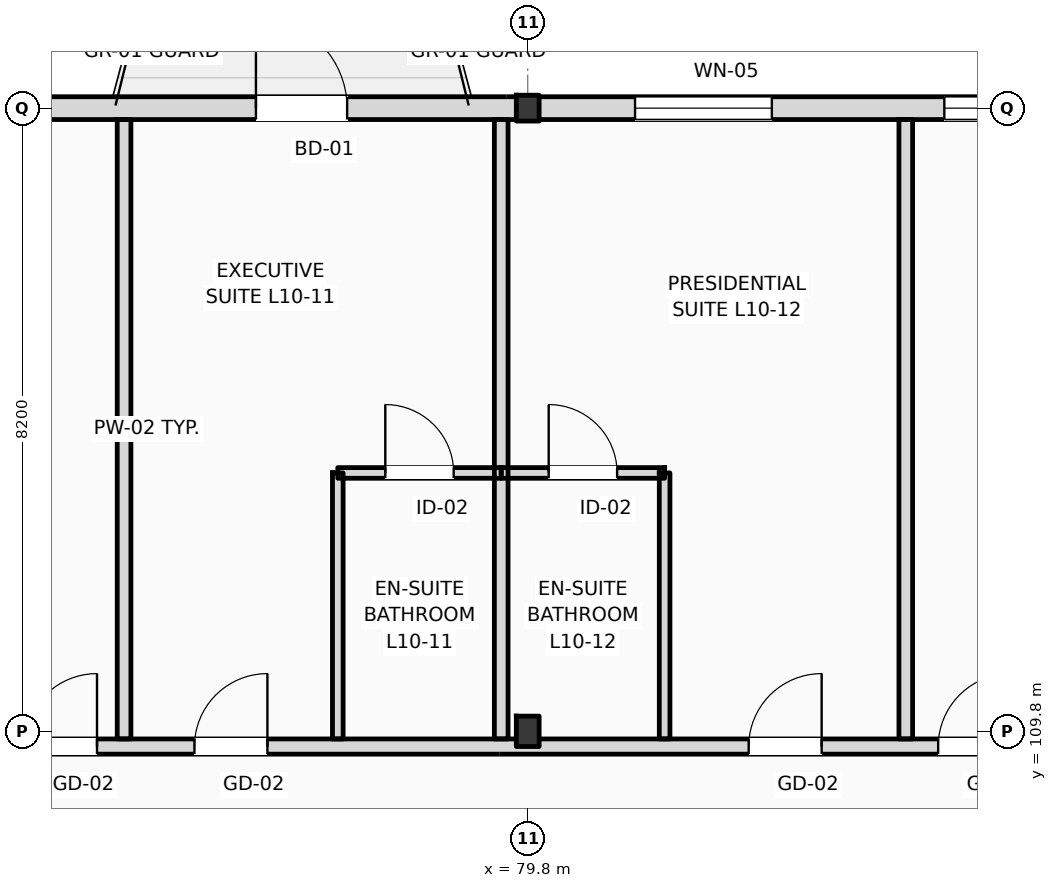
"""IFC4 building model, lengths in metres.
Left out: names, types, materials, properties, quantities, classifications, styles, units other than length and angle.
Written with IfcOpenShell. Run it as: python <this file> out.ifc"""

import sys

from ifc_helpers import new_model, si_unit, direction, frame, frame_2d, origin, origin_2d, place, context, subcontext, project, spatial, rectangle, i_section, extrude, element, fill, save


model = new_model("IFC4")
c1 = context("Model", 3, precision=1e-05, world=origin(), true_north=direction((0.0, 1.0)))
c2 = subcontext(c1, "Body", "Model", "MODEL_VIEW")
j1 = project(units=[si_unit("LENGTHUNIT", "METRE"), si_unit("PLANEANGLEUNIT", "RADIAN")], contexts=[c1])
p1 = place(None, origin())
s1 = spatial("IfcSite", under=j1, at=p1, CompositionType="ELEMENT")
p2 = place(p1, origin())
s2 = spatial("IfcBuilding", under=s1, at=p2, CompositionType="ELEMENT")
p3 = place(p2, frame((0.0, 0.0, 42.6)))
s3 = spatial("IfcBuildingStorey", under=s2, at=p3, CompositionType="ELEMENT", Elevation=42.6)
p4 = place(p3, frame((79.8, 109.8, 0.0), z_axis=(0.0, 0.0, 1.0), x_axis=(1.0, 0.0, 0.0)))
e1 = element("IfcColumn", 1, at=p4, inside=s3, PredefinedType="COLUMN", context=c2, shape_type="SweptSolid", body=[
    extrude(i_section(OverallWidth=0.3, OverallDepth=0.4, WebThickness=0.013, FlangeThickness=0.024, FilletRadius=0.027, at=origin_2d()), origin(), (0.0, 0.0, 1.0), 4.2),
])
p5 = place(p3, frame((79.8, 118.0, 0.0), z_axis=(0.0, 0.0, 1.0), x_axis=(1.0, 0.0, 0.0)))
e2 = element("IfcColumn", 2, at=p5, inside=s3, PredefinedType="COLUMN", context=c2, shape_type="SweptSolid", body=[
    extrude(i_section(OverallWidth=0.3, OverallDepth=0.34, WebThickness=0.012, FlangeThickness=0.021, FilletRadius=0.027, at=origin_2d()), origin(), (0.0, 0.0, 1.0), 4.2),
])
p6 = place(p3, frame((22.5, 118.0, 0.0), z_axis=(0.0, 0.0, 1.0), x_axis=(1.0, 0.0, 0.0)))
e3 = element("IfcWall", 3, at=p6, inside=s3, PredefinedType="STANDARD", context=c2, shape_type="SweptSolid", body=[
    extrude(rectangle(XDim=72.9, YDim=0.3, at=frame_2d((36.45, 0.0))), origin(), (0.0, 0.0, 1.0), 3.42),
])
p7 = place(p6, frame((3.611, 0.0, 0.9)))
e4 = element("IfcOpeningElement", 4, at=p7, cuts=e3, PredefinedType="OPENING", context=c2, shape_type="SweptSolid", body=[
    extrude(rectangle(XDim=1.35, YDim=1.75, at=frame_2d((0.675, 0.875))), frame((0.0, 0.16, 0.0), z_axis=(0.0, -1.0, 0.0), x_axis=(1.0, 0.0, 0.0)), (0.0, 0.0, 1.0), 0.32),
])
p8 = place(p6, frame((7.091, 0.0, 0.0)))
e5 = element("IfcOpeningElement", 5, at=p8, cuts=e3, PredefinedType="OPENING", context=c2, shape_type="SweptSolid", body=[
    extrude(rectangle(XDim=1.2, YDim=2.25, at=frame_2d((0.6, 1.125))), frame((0.0, 0.16, 0.0), z_axis=(0.0, -1.0, 0.0), x_axis=(1.0, 0.0, 0.0)), (0.0, 0.0, 1.0), 0.32),
])
p9 = place(p6, frame((12.328, 0.0, 0.9)))
e6 = element("IfcOpeningElement", 6, at=p9, cuts=e3, PredefinedType="OPENING", context=c2, shape_type="SweptSolid", body=[
    extrude(rectangle(XDim=2.0, YDim=2.34, at=frame_2d((1.0, 1.17))), frame((0.0, 0.16, 0.0), z_axis=(0.0, -1.0, 0.0), x_axis=(1.0, 0.0, 0.0)), (0.0, 0.0, 1.0), 0.32),
])
p10 = place(p6, frame((19.12, 0.0, 0.9)))
e7 = element("IfcOpeningElement", 7, at=p10, cuts=e3, PredefinedType="OPENING", context=c2, shape_type="SweptSolid", body=[
    extrude(rectangle(XDim=1.35, YDim=2.34, at=frame_2d((0.675, 1.17))), frame((0.0, 0.16, 0.0), z_axis=(0.0, -1.0, 0.0), x_axis=(1.0, 0.0, 0.0)), (0.0, 0.0, 1.0), 0.32),
])
p11 = place(p6, frame((22.696, 0.0, 0.0)))
e8 = element("IfcOpeningElement", 8, at=p11, cuts=e3, PredefinedType="OPENING", context=c2, shape_type="SweptSolid", body=[
    extrude(rectangle(XDim=1.2, YDim=2.25, at=frame_2d((0.6, 1.125))), frame((0.0, 0.16, 0.0), z_axis=(0.0, -1.0, 0.0), x_axis=(1.0, 0.0, 0.0)), (0.0, 0.0, 1.0), 0.32),
])
p12 = place(p6, frame((27.205, 0.0, 0.9)))
e9 = element("IfcOpeningElement", 9, at=p12, cuts=e3, PredefinedType="OPENING", context=c2, shape_type="SweptSolid", body=[
    extrude(rectangle(XDim=3.1, YDim=2.34, at=frame_2d((1.55, 1.17))), frame((0.0, 0.16, 0.0), z_axis=(0.0, -1.0, 0.0), x_axis=(1.0, 0.0, 0.0)), (0.0, 0.0, 1.0), 0.32),
])
p13 = place(p6, frame((31.948, 0.0, 0.9)))
e10 = element("IfcOpeningElement", 10, at=p13, cuts=e3, PredefinedType="OPENING", context=c2, shape_type="SweptSolid", body=[
    extrude(rectangle(XDim=1.1, YDim=2.34, at=frame_2d((0.55, 1.17))), frame((0.0, 0.16, 0.0), z_axis=(0.0, -1.0, 0.0), x_axis=(1.0, 0.0, 0.0)), (0.0, 0.0, 1.0), 0.32),
])
p14 = place(p6, frame((38.12, 0.0, 0.0)))
e11 = element("IfcOpeningElement", 11, at=p14, cuts=e3, PredefinedType="OPENING", context=c2, shape_type="SweptSolid", body=[
    extrude(rectangle(XDim=1.2, YDim=2.25, at=frame_2d((0.6, 1.125))), frame((0.0, 0.16, 0.0), z_axis=(0.0, -1.0, 0.0), x_axis=(1.0, 0.0, 0.0)), (0.0, 0.0, 1.0), 0.32),
])
p15 = place(p6, frame((43.51, 0.0, 0.9)))
e12 = element("IfcOpeningElement", 12, at=p15, cuts=e3, PredefinedType="OPENING", context=c2, shape_type="SweptSolid", body=[
    extrude(rectangle(XDim=1.35, YDim=1.85, at=frame_2d((0.675, 0.925))), frame((0.0, 0.16, 0.0), z_axis=(0.0, -1.0, 0.0), x_axis=(1.0, 0.0, 0.0)), (0.0, 0.0, 1.0), 0.32),
])
p16 = place(p6, frame((47.178, 0.0, 0.9)))
e13 = element("IfcOpeningElement", 13, at=p16, cuts=e3, PredefinedType="OPENING", context=c2, shape_type="SweptSolid", body=[
    extrude(rectangle(XDim=1.5, YDim=1.9, at=frame_2d((0.75, 0.95))), frame((0.0, 0.16, 0.0), z_axis=(0.0, -1.0, 0.0), x_axis=(1.0, 0.0, 0.0)), (0.0, 0.0, 1.0), 0.32),
])
p17 = place(p6, frame((53.724, 0.0, 0.0)))
e14 = element("IfcOpeningElement", 14, at=p17, cuts=e3, PredefinedType="OPENING", context=c2, shape_type="SweptSolid", body=[
    extrude(rectangle(XDim=1.2, YDim=2.25, at=frame_2d((0.6, 1.125))), frame((0.0, 0.16, 0.0), z_axis=(0.0, -1.0, 0.0), x_axis=(1.0, 0.0, 0.0)), (0.0, 0.0, 1.0), 0.32),
])
p18 = place(p6, frame((58.712, 0.0, 0.9)))
e15 = element("IfcOpeningElement", 15, at=p18, cuts=e3, PredefinedType="OPENING", context=c2, shape_type="SweptSolid", body=[
    extrude(rectangle(XDim=1.8, YDim=2.0, at=frame_2d((0.9, 1.0))), frame((0.0, 0.16, 0.0), z_axis=(0.0, -1.0, 0.0), x_axis=(1.0, 0.0, 0.0)), (0.0, 0.0, 1.0), 0.32),
])
p19 = place(p6, frame((62.781, 0.0, 0.9)))
e16 = element("IfcOpeningElement", 16, at=p19, cuts=e3, PredefinedType="OPENING", context=c2, shape_type="SweptSolid", body=[
    extrude(rectangle(XDim=1.35, YDim=2.05, at=frame_2d((0.675, 1.025))), frame((0.0, 0.16, 0.0), z_axis=(0.0, -1.0, 0.0), x_axis=(1.0, 0.0, 0.0)), (0.0, 0.0, 1.0), 0.32),
])
p20 = place(p6, frame((68.819, 0.0, 0.9)))
e17 = element("IfcOpeningElement", 17, at=p20, cuts=e3, PredefinedType="OPENING", context=c2, shape_type="SweptSolid", body=[
    extrude(rectangle(XDim=2.1, YDim=2.1, at=frame_2d((1.05, 1.05))), frame((0.0, 0.16, 0.0), z_axis=(0.0, -1.0, 0.0), x_axis=(1.0, 0.0, 0.0)), (0.0, 0.0, 1.0), 0.32),
])
p21 = place(p3, frame((10.65, 109.6, 0.0), z_axis=(0.0, 0.0, 1.0), x_axis=(1.0, 0.0, 0.0)))
e18 = element("IfcWall", 18, at=p21, inside=s3, PredefinedType="PARTITIONING", context=c2, shape_type="SweptSolid", body=[
    extrude(rectangle(XDim=84.61, YDim=0.2, at=frame_2d((42.305, 0.0))), origin(), (0.0, 0.0, 1.0), 3.38),
])
p22 = place(p21, frame((15.926, 0.0, 0.0)))
e19 = element("IfcOpeningElement", 19, at=p22, cuts=e18, PredefinedType="OPENING", context=c2, shape_type="SweptSolid", body=[
    extrude(rectangle(XDim=1.02, YDim=2.2, at=frame_2d((0.51, 1.1))), frame((0.0, 0.11, 0.0), z_axis=(0.0, -1.0, 0.0), x_axis=(1.0, 0.0, 0.0)), (0.0, 0.0, 1.0), 0.22),
])
p23 = place(p21, frame((18.45, 0.0, 0.0)))
e20 = element("IfcOpeningElement", 20, at=p23, cuts=e18, PredefinedType="OPENING", context=c2, shape_type="SweptSolid", body=[
    extrude(rectangle(XDim=1.02, YDim=2.2, at=frame_2d((0.51, 1.1))), frame((0.0, 0.11, 0.0), z_axis=(0.0, -1.0, 0.0), x_axis=(1.0, 0.0, 0.0)), (0.0, 0.0, 1.0), 0.22),
])
p24 = place(p21, frame((25.742, 0.0, 0.0)))
e21 = element("IfcOpeningElement", 21, at=p24, cuts=e18, PredefinedType="OPENING", context=c2, shape_type="SweptSolid", body=[
    extrude(rectangle(XDim=1.02, YDim=2.2, at=frame_2d((0.51, 1.1))), frame((0.0, 0.11, 0.0), z_axis=(0.0, -1.0, 0.0), x_axis=(1.0, 0.0, 0.0)), (0.0, 0.0, 1.0), 0.22),
])
p25 = place(p21, frame((31.385, 0.0, 0.0)))
e22 = element("IfcOpeningElement", 22, at=p25, cuts=e18, PredefinedType="OPENING", context=c2, shape_type="SweptSolid", body=[
    extrude(rectangle(XDim=1.02, YDim=2.2, at=frame_2d((0.51, 1.1))), frame((0.0, 0.11, 0.0), z_axis=(0.0, -1.0, 0.0), x_axis=(1.0, 0.0, 0.0)), (0.0, 0.0, 1.0), 0.22),
])
p26 = place(p21, frame((33.908, 0.0, 0.0)))
e23 = element("IfcOpeningElement", 23, at=p26, cuts=e18, PredefinedType="OPENING", context=c2, shape_type="SweptSolid", body=[
    extrude(rectangle(XDim=0.96, YDim=2.2, at=frame_2d((0.48, 1.1))), frame((0.0, 0.11, 0.0), z_axis=(0.0, -1.0, 0.0), x_axis=(1.0, 0.0, 0.0)), (0.0, 0.0, 1.0), 0.22),
])
p27 = place(p21, frame((41.201, 0.0, 0.0)))
e24 = element("IfcOpeningElement", 24, at=p27, cuts=e18, PredefinedType="OPENING", context=c2, shape_type="SweptSolid", body=[
    extrude(rectangle(XDim=0.96, YDim=2.2, at=frame_2d((0.48, 1.1))), frame((0.0, 0.11, 0.0), z_axis=(0.0, -1.0, 0.0), x_axis=(1.0, 0.0, 0.0)), (0.0, 0.0, 1.0), 0.22),
])
p28 = place(p21, frame((46.844, 0.0, 0.0)))
e25 = element("IfcOpeningElement", 25, at=p28, cuts=e18, PredefinedType="OPENING", context=c2, shape_type="SweptSolid", body=[
    extrude(rectangle(XDim=0.96, YDim=2.2, at=frame_2d((0.48, 1.1))), frame((0.0, 0.11, 0.0), z_axis=(0.0, -1.0, 0.0), x_axis=(1.0, 0.0, 0.0)), (0.0, 0.0, 1.0), 0.22),
])
p29 = place(p21, frame((49.337, 0.0, 0.0)))
e26 = element("IfcOpeningElement", 26, at=p29, cuts=e18, PredefinedType="OPENING", context=c2, shape_type="SweptSolid", body=[
    extrude(rectangle(XDim=0.96, YDim=2.2, at=frame_2d((0.48, 1.1))), frame((0.0, 0.11, 0.0), z_axis=(0.0, -1.0, 0.0), x_axis=(1.0, 0.0, 0.0)), (0.0, 0.0, 1.0), 0.22),
])
p30 = place(p21, frame((56.63, 0.0, 0.0)))
e27 = element("IfcOpeningElement", 27, at=p30, cuts=e18, PredefinedType="OPENING", context=c2, shape_type="SweptSolid", body=[
    extrude(rectangle(XDim=0.96, YDim=2.2, at=frame_2d((0.48, 1.1))), frame((0.0, 0.11, 0.0), z_axis=(0.0, -1.0, 0.0), x_axis=(1.0, 0.0, 0.0)), (0.0, 0.0, 1.0), 0.22),
])
p31 = place(p21, frame((62.523, 0.0, 0.0)))
e28 = element("IfcOpeningElement", 28, at=p31, cuts=e18, PredefinedType="OPENING", context=c2, shape_type="SweptSolid", body=[
    extrude(rectangle(XDim=0.96, YDim=2.2, at=frame_2d((0.48, 1.1))), frame((0.0, 0.11, 0.0), z_axis=(0.0, -1.0, 0.0), x_axis=(1.0, 0.0, 0.0)), (0.0, 0.0, 1.0), 0.22),
])
p32 = place(p21, frame((64.765, 0.0, 0.0)))
e29 = element("IfcOpeningElement", 29, at=p32, cuts=e18, PredefinedType="OPENING", context=c2, shape_type="SweptSolid", body=[
    extrude(rectangle(XDim=0.96, YDim=2.2, at=frame_2d((0.48, 1.1))), frame((0.0, 0.11, 0.0), z_axis=(0.0, -1.0, 0.0), x_axis=(1.0, 0.0, 0.0)), (0.0, 0.0, 1.0), 0.22),
])
p33 = place(p21, frame((72.057, 0.0, 0.0)))
e30 = element("IfcOpeningElement", 30, at=p33, cuts=e18, PredefinedType="OPENING", context=c2, shape_type="SweptSolid", body=[
    extrude(rectangle(XDim=0.96, YDim=2.2, at=frame_2d((0.48, 1.1))), frame((0.0, 0.11, 0.0), z_axis=(0.0, -1.0, 0.0), x_axis=(1.0, 0.0, 0.0)), (0.0, 0.0, 1.0), 0.22),
])
p34 = place(p21, frame((74.55, 0.0, 0.0)))
e31 = element("IfcOpeningElement", 31, at=p34, cuts=e18, PredefinedType="OPENING", context=c2, shape_type="SweptSolid", body=[
    extrude(rectangle(XDim=0.96, YDim=2.2, at=frame_2d((0.48, 1.1))), frame((0.0, 0.11, 0.0), z_axis=(0.0, -1.0, 0.0), x_axis=(1.0, 0.0, 0.0)), (0.0, 0.0, 1.0), 0.22),
])
p35 = place(p21, frame((80.163, 0.0, 0.0)))
e32 = element("IfcOpeningElement", 32, at=p35, cuts=e18, PredefinedType="OPENING", context=c2, shape_type="SweptSolid", body=[
    extrude(rectangle(XDim=0.96, YDim=2.2, at=frame_2d((0.48, 1.1))), frame((0.0, 0.11, 0.0), z_axis=(0.0, -1.0, 0.0), x_axis=(1.0, 0.0, 0.0)), (0.0, 0.0, 1.0), 0.22),
])
p36 = place(p21, frame((2.716, 0.0, 0.0)))
e33 = element("IfcOpeningElement", 33, at=p36, cuts=e18, PredefinedType="OPENING", context=c2, shape_type="SweptSolid", body=[
    extrude(rectangle(XDim=1.35, YDim=2.25, at=frame_2d((0.675, 1.125))), frame((0.0, 0.11, 0.0), z_axis=(0.0, -1.0, 0.0), x_axis=(1.0, 0.0, 0.0)), (0.0, 0.0, 1.0), 0.22),
])
p37 = place(p21, frame((6.65, 0.0, 0.0)))
e34 = element("IfcOpeningElement", 34, at=p37, cuts=e18, PredefinedType="OPENING", context=c2, shape_type="SweptSolid", body=[
    extrude(rectangle(XDim=1.35, YDim=2.25, at=frame_2d((0.675, 1.125))), frame((0.0, 0.11, 0.0), z_axis=(0.0, -1.0, 0.0), x_axis=(1.0, 0.0, 0.0)), (0.0, 0.0, 1.0), 0.22),
])
p38 = place(p21, frame((10.583, 0.0, 0.0)))
e35 = element("IfcOpeningElement", 35, at=p38, cuts=e18, PredefinedType="OPENING", context=c2, shape_type="SweptSolid", body=[
    extrude(rectangle(XDim=1.35, YDim=2.25, at=frame_2d((0.675, 1.125))), frame((0.0, 0.11, 0.0), z_axis=(0.0, -1.0, 0.0), x_axis=(1.0, 0.0, 0.0)), (0.0, 0.0, 1.0), 0.22),
])
p39 = place(p3, frame((74.489, 109.7, 0.0), z_axis=(0.0, 0.0, 1.0), x_axis=(0.0, 1.0, 0.0)))
e36 = element("IfcWall", 36, at=p39, inside=s3, PredefinedType="PARTITIONING", context=c2, shape_type="SweptSolid", body=[
    extrude(rectangle(XDim=8.15, YDim=0.18, at=frame_2d((4.075, 0.0))), origin(), (0.0, 0.0, 1.0), 3.63),
])
p40 = place(p3, frame((79.451, 109.7, 0.0), z_axis=(0.0, 0.0, 1.0), x_axis=(0.0, 1.0, 0.0)))
e37 = element("IfcWall", 37, at=p40, inside=s3, PredefinedType="PARTITIONING", context=c2, shape_type="SweptSolid", body=[
    extrude(rectangle(XDim=8.15, YDim=0.18, at=frame_2d((4.075, 0.0))), origin(), (0.0, 0.0, 1.0), 3.94),
])
p41 = place(p3, frame((77.301, 109.7, 0.0), z_axis=(0.0, 0.0, 1.0), x_axis=(0.0, 1.0, 0.0)))
e38 = element("IfcWall", 38, at=p41, inside=s3, PredefinedType="PARTITIONING", context=c2, shape_type="SweptSolid", body=[
    extrude(rectangle(XDim=3.5, YDim=0.14, at=frame_2d((1.75, 0.0))), origin(), (0.0, 0.0, 1.0), 3.63),
])
p42 = place(p3, frame((77.301, 113.2, 0.0), z_axis=(0.0, 0.0, 1.0), x_axis=(1.0, 0.0, 0.0)))
e39 = element("IfcWall", 39, at=p42, inside=s3, PredefinedType="PARTITIONING", context=c2, shape_type="SweptSolid", body=[
    extrude(rectangle(XDim=2.15, YDim=0.14, at=frame_2d((1.075, 0.0))), origin(), (0.0, 0.0, 1.0), 3.94),
])
p43 = place(p42, frame((0.625, 0.0, 0.0)))
e40 = element("IfcOpeningElement", 40, at=p43, cuts=e39, PredefinedType="OPENING", context=c2, shape_type="SweptSolid", body=[
    extrude(rectangle(XDim=0.9, YDim=2.1, at=frame_2d((0.45, 1.05))), frame((0.0, 0.08, 0.0), z_axis=(0.0, -1.0, 0.0), x_axis=(1.0, 0.0, 0.0)), (0.0, 0.0, 1.0), 0.16),
])
p44 = place(p3, frame((84.774, 109.7, 0.0), z_axis=(0.0, 0.0, 1.0), x_axis=(0.0, 1.0, 0.0)))
e41 = element("IfcWall", 41, at=p44, inside=s3, PredefinedType="PARTITIONING", context=c2, shape_type="SweptSolid", body=[
    extrude(rectangle(XDim=8.15, YDim=0.18, at=frame_2d((4.075, 0.0))), origin(), (0.0, 0.0, 1.0), 3.57),
])
p45 = place(p3, frame((81.601, 109.7, 0.0), z_axis=(0.0, 0.0, 1.0), x_axis=(0.0, 1.0, 0.0)))
e42 = element("IfcWall", 42, at=p45, inside=s3, PredefinedType="PARTITIONING", context=c2, shape_type="SweptSolid", body=[
    extrude(rectangle(XDim=3.5, YDim=0.14, at=frame_2d((1.75, 0.0))), origin(), (0.0, 0.0, 1.0), 3.94),
])
p46 = place(p3, frame((79.451, 113.2, 0.0), z_axis=(0.0, 0.0, 1.0), x_axis=(1.0, 0.0, 0.0)))
e43 = element("IfcWall", 43, at=p46, inside=s3, PredefinedType="PARTITIONING", context=c2, shape_type="SweptSolid", body=[
    extrude(rectangle(XDim=2.15, YDim=0.14, at=frame_2d((1.075, 0.0))), origin(), (0.0, 0.0, 1.0), 3.94),
])
p47 = place(p46, frame((0.625, 0.0, 0.0)))
e44 = element("IfcOpeningElement", 44, at=p47, cuts=e43, PredefinedType="OPENING", context=c2, shape_type="SweptSolid", body=[
    extrude(rectangle(XDim=0.9, YDim=2.1, at=frame_2d((0.45, 1.05))), frame((0.0, 0.08, 0.0), z_axis=(0.0, -1.0, 0.0), x_axis=(1.0, 0.0, 0.0)), (0.0, 0.0, 1.0), 0.16),
])
p48 = place(p17, origin())
e45 = element("IfcDoor", 45, at=p48, inside=s3, OperationType="SINGLE_SWING_LEFT", PredefinedType="DOOR", context=c2, shape_type="SweptSolid", body=[
    extrude(rectangle(XDim=1.2, YDim=2.25, at=frame_2d((0.6, 1.125))), frame((0.0, 0.025, 0.0), z_axis=(0.0, -1.0, 0.0), x_axis=(1.0, 0.0, 0.0)), (0.0, 0.0, 1.0), 0.05),
])
fill(e14, e45)
p49 = place(p18, origin())
e46 = element("IfcWindow", 46, at=p49, inside=s3, PartitioningType="DOUBLE_PANEL_VERTICAL", PredefinedType="WINDOW", context=c2, shape_type="SweptSolid", body=[
    extrude(rectangle(XDim=1.8, YDim=2.0, at=frame_2d((0.9, 1.0))), frame((0.0, 0.03, 0.0), z_axis=(0.0, -1.0, 0.0), x_axis=(1.0, 0.0, 0.0)), (0.0, 0.0, 1.0), 0.06),
])
fill(e15, e46)
p50 = place(p19, origin())
e47 = element("IfcWindow", 47, at=p50, inside=s3, PartitioningType="DOUBLE_PANEL_VERTICAL", PredefinedType="WINDOW", context=c2, shape_type="SweptSolid", body=[
    extrude(rectangle(XDim=1.35, YDim=2.05, at=frame_2d((0.675, 1.025))), frame((0.0, 0.03, 0.0), z_axis=(0.0, -1.0, 0.0), x_axis=(1.0, 0.0, 0.0)), (0.0, 0.0, 1.0), 0.06),
])
fill(e16, e47)
p51 = place(p31, origin())
e48 = element("IfcDoor", 48, at=p51, inside=s3, OperationType="SINGLE_SWING_RIGHT", PredefinedType="DOOR", context=c2, shape_type="SweptSolid", body=[
    extrude(rectangle(XDim=0.96, YDim=2.2, at=frame_2d((0.48, 1.1))), frame((0.0, 0.025, 0.0), z_axis=(0.0, -1.0, 0.0), x_axis=(1.0, 0.0, 0.0)), (0.0, 0.0, 1.0), 0.05),
])
fill(e28, e48)
p52 = place(p32, origin())
e49 = element("IfcDoor", 49, at=p52, inside=s3, OperationType="SINGLE_SWING_RIGHT", PredefinedType="DOOR", context=c2, shape_type="SweptSolid", body=[
    extrude(rectangle(XDim=0.96, YDim=2.2, at=frame_2d((0.48, 1.1))), frame((0.0, 0.025, 0.0), z_axis=(0.0, -1.0, 0.0), x_axis=(1.0, 0.0, 0.0)), (0.0, 0.0, 1.0), 0.05),
])
fill(e29, e49)
p53 = place(p43, origin())
e50 = element("IfcDoor", 50, at=p53, inside=s3, OperationType="SINGLE_SWING_LEFT", PredefinedType="DOOR", context=c2, shape_type="SweptSolid", body=[
    extrude(rectangle(XDim=0.9, YDim=2.1, at=frame_2d((0.45, 1.05))), frame((0.0, 0.025, 0.0), z_axis=(0.0, -1.0, 0.0), x_axis=(1.0, 0.0, 0.0)), (0.0, 0.0, 1.0), 0.05),
])
fill(e40, e50)
p54 = place(p33, origin())
e51 = element("IfcDoor", 51, at=p54, inside=s3, OperationType="SINGLE_SWING_RIGHT", PredefinedType="DOOR", context=c2, shape_type="SweptSolid", body=[
    extrude(rectangle(XDim=0.96, YDim=2.2, at=frame_2d((0.48, 1.1))), frame((0.0, 0.025, 0.0), z_axis=(0.0, -1.0, 0.0), x_axis=(1.0, 0.0, 0.0)), (0.0, 0.0, 1.0), 0.05),
])
fill(e30, e51)
p55 = place(p47, origin())
e52 = element("IfcDoor", 52, at=p55, inside=s3, OperationType="SINGLE_SWING_LEFT", PredefinedType="DOOR", context=c2, shape_type="SweptSolid", body=[
    extrude(rectangle(XDim=0.9, YDim=2.1, at=frame_2d((0.45, 1.05))), frame((0.0, 0.025, 0.0), z_axis=(0.0, -1.0, 0.0), x_axis=(1.0, 0.0, 0.0)), (0.0, 0.0, 1.0), 0.05),
])
fill(e44, e52)
p56 = place(p34, origin())
e53 = element("IfcDoor", 53, at=p56, inside=s3, OperationType="SINGLE_SWING_RIGHT", PredefinedType="DOOR", context=c2, shape_type="SweptSolid", body=[
    extrude(rectangle(XDim=0.96, YDim=2.2, at=frame_2d((0.48, 1.1))), frame((0.0, 0.025, 0.0), z_axis=(0.0, -1.0, 0.0), x_axis=(1.0, 0.0, 0.0)), (0.0, 0.0, 1.0), 0.05),
])
fill(e31, e53)
save(model, sys.argv[1])
